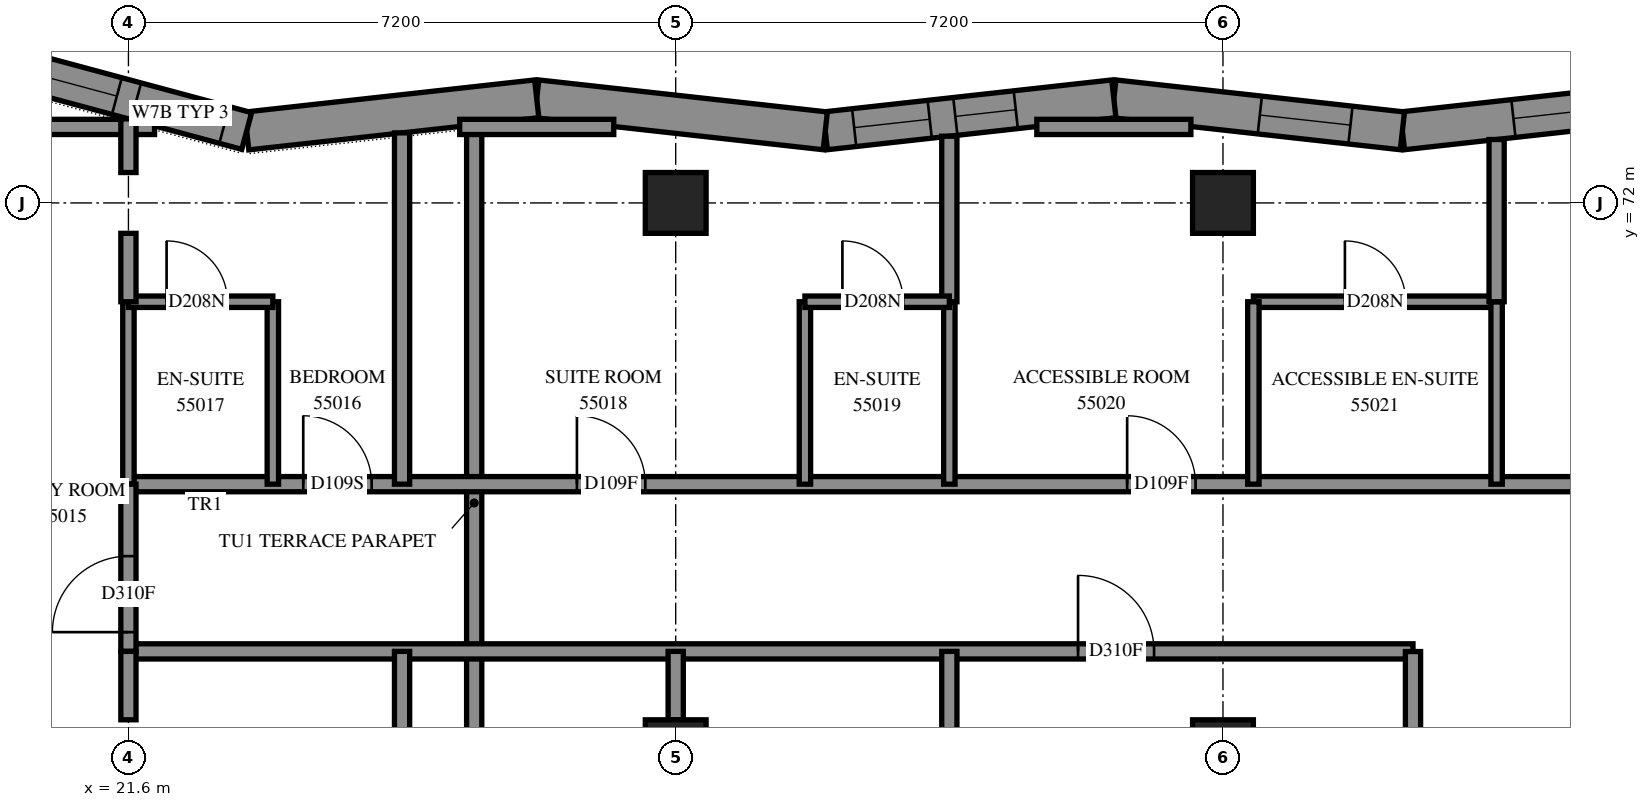
"""IFC4 building model, lengths in metres.
Left out: names, types, materials, properties, quantities, classifications, styles, units other than length and angle.
Written with IfcOpenShell. Run it as: python <this file> out.ifc"""

import sys

from ifc_helpers import new_model, si_unit, direction, frame, frame_2d, origin, origin_2d, place, context, subcontext, project, spatial, polyline, rectangle, outline, extrude, element, fill, save


model = new_model("IFC4")
c1 = context("Model", 3, precision=1e-05, world=origin(), true_north=direction((0.0, 1.0)))
c2 = subcontext(c1, "Body", "Model", "MODEL_VIEW")
j1 = project(units=[si_unit("LENGTHUNIT", "METRE"), si_unit("PLANEANGLEUNIT", "RADIAN")], contexts=[c1])
p1 = place(None, origin())
s1 = spatial("IfcSite", under=j1, at=p1, CompositionType="ELEMENT")
p2 = place(p1, origin())
s2 = spatial("IfcBuilding", under=s1, at=p2, CompositionType="ELEMENT")
p3 = place(p2, frame((0.0, 0.0, 203.2)))
s3 = spatial("IfcBuildingStorey", under=s2, at=p3, CompositionType="ELEMENT", Elevation=203.2)
for number, where, z_axis, x_axis in (
    (1, (28.8, 64.8, 0.0), (0.0, 0.0, 1.0), (1.0, 0.0, 0.0)),
    (2, (28.8, 72.0, 0.0), (0.0, 0.0, 1.0), (1.0, 0.0, 0.0)),
    (3, (36.0, 64.8, 0.0), (0.0, 0.0, 1.0), (1.0, 0.0, 0.0)),
    (4, (36.0, 72.0, 0.0), (0.0, 0.0, 1.0), (1.0, 0.0, 0.0)),
):
    element("IfcColumn", number, at=place(p3, frame(where, z_axis=z_axis, x_axis=x_axis)), inside=s3, PredefinedType="COLUMN", context=c2, shape_type="SweptSolid", body=[
        extrude(rectangle(XDim=0.8, YDim=0.8, at=origin_2d()), origin(), (0.0, 0.0, 1.0), 3.1),
    ])
p4 = place(p3, frame((42.157, 73.37, 0.0), z_axis=(0.0, 0.0, 1.0), x_axis=(-0.99390702, -0.1102217568, 0.0)))
e5 = element("IfcWall", 5, at=p4, inside=s3, PredefinedType="SOLIDWALL", context=c2, shape_type="SweptSolid", body=[
    extrude(outline(polyline([(-0.028, -0.25), (3.792, -0.25), (3.847, 0.25), (0.028, 0.25), (-0.028, -0.25)])), origin(), (0.0, 0.0, 1.0), 3.1),
])
p5 = place(p4, frame((1.15, 0.0, 0.45)))
e6 = element("IfcOpeningElement", 6, at=p5, cuts=e5, PredefinedType="OPENING", context=c2, shape_type="SweptSolid", body=[
    extrude(rectangle(XDim=1.2, YDim=2.5, at=frame_2d((0.6, 1.25))), frame((0.0, 0.26, 0.0), z_axis=(0.0, -1.0, 0.0), x_axis=(1.0, 0.0, 0.0)), (0.0, 0.0, 1.0), 0.52),
])
p6 = place(p3, frame((38.361, 72.948, 0.0), z_axis=(0.0, 0.0, 1.0), x_axis=(-0.99390702, 0.1102217568, 0.0)))
e7 = element("IfcWall", 7, at=p6, inside=s3, PredefinedType="SOLIDWALL", context=c2, shape_type="SweptSolid", body=[
    extrude(outline(polyline([(0.028, -0.25), (3.847, -0.25), (3.792, 0.25), (-0.028, 0.25), (0.028, -0.25)])), origin(), (0.0, 0.0, 1.0), 3.1),
])
p7 = place(p6, frame((0.688, 0.0, 0.45)))
e8 = element("IfcOpeningElement", 8, at=p7, cuts=e7, PredefinedType="OPENING", context=c2, shape_type="SweptSolid", body=[
    extrude(rectangle(XDim=1.2, YDim=2.5, at=frame_2d((0.6, 1.25))), frame((0.0, 0.26, 0.0), z_axis=(0.0, -1.0, 0.0), x_axis=(1.0, 0.0, 0.0)), (0.0, 0.0, 1.0), 0.52),
])
p8 = place(p3, frame((34.564, 73.37, 0.0), z_axis=(0.0, 0.0, 1.0), x_axis=(-0.993907338, -0.1102188888, 0.0)))
e9 = element("IfcWall", 9, at=p8, inside=s3, PredefinedType="SOLIDWALL", context=c2, shape_type="SweptSolid", body=[
    extrude(outline(polyline([(-0.028, -0.25), (3.792, -0.25), (3.847, 0.25), (0.028, 0.25), (-0.028, -0.25)])), origin(), (0.0, 0.0, 1.0), 3.1),
])
p9 = place(p8, frame((1.298, 0.0, 0.45)))
e10 = element("IfcOpeningElement", 10, at=p9, cuts=e9, PredefinedType="OPENING", context=c2, shape_type="SweptSolid", body=[
    extrude(rectangle(XDim=0.8, YDim=2.5, at=frame_2d((0.4, 1.25))), frame((0.0, 0.26, 0.0), z_axis=(0.0, -1.0, 0.0), x_axis=(1.0, 0.0, 0.0)), (0.0, 0.0, 1.0), 0.52),
])
p10 = place(p8, frame((2.437, 0.0, 0.45)))
e11 = element("IfcOpeningElement", 11, at=p10, cuts=e9, PredefinedType="OPENING", context=c2, shape_type="SweptSolid", body=[
    extrude(rectangle(XDim=1.0, YDim=2.5, at=frame_2d((0.5, 1.25))), frame((0.0, 0.26, 0.0), z_axis=(0.0, -1.0, 0.0), x_axis=(1.0, 0.0, 0.0)), (0.0, 0.0, 1.0), 0.52),
])
p11 = place(p3, frame((30.768, 72.948, 0.0), z_axis=(0.0, 0.0, 1.0), x_axis=(-0.99390702, 0.1102217568, 0.0)))
e12 = element("IfcWall", 12, at=p11, inside=s3, PredefinedType="SOLIDWALL", context=c2, shape_type="SweptSolid", body=[
    extrude(outline(polyline([(0.028, -0.25), (3.847, -0.25), (3.792, 0.25), (-0.028, 0.25), (0.028, -0.25)])), origin(), (0.0, 0.0, 1.0), 3.1),
])
p12 = place(p3, frame((26.972, 73.37, 0.0), z_axis=(0.0, 0.0, 1.0), x_axis=(-0.9939053168, -0.1102371135, 0.0)))
e13 = element("IfcWall", 13, at=p12, inside=s3, PredefinedType="SOLIDWALL", context=c2, shape_type="SweptSolid", body=[
    extrude(outline(polyline([(-0.028, -0.25), (3.792, -0.25), (3.886, 0.25), (0.028, 0.25), (-0.028, -0.25)])), origin(), (0.0, 0.0, 1.0), 3.1),
])
p13 = place(p3, frame((23.156, 72.946, 0.0), z_axis=(0.0, 0.0, 1.0), x_axis=(-0.9656828727, 0.2597240638, 0.0)))
e14 = element("IfcWall", 14, at=p13, inside=s3, PredefinedType="SOLIDWALL", context=c2, shape_type="SweptSolid", body=[
    extrude(outline(polyline([(0.047, -0.25), (3.978, -0.25), (3.326, 0.25), (-0.047, 0.25), (0.047, -0.25)])), origin(), (0.0, 0.0, 1.0), 3.1),
])
p14 = place(p13, frame((0.306, 0.0, 0.7)))
e15 = element("IfcOpeningElement", 15, at=p14, cuts=e14, PredefinedType="OPENING", context=c2, shape_type="SweptSolid", body=[
    extrude(rectangle(XDim=1.2, YDim=2.1, at=frame_2d((0.6, 1.05))), frame((0.0, 0.26, 0.0), z_axis=(0.0, -1.0, 0.0), x_axis=(1.0, 0.0, 0.0)), (0.0, 0.0, 1.0), 0.52),
])
p15 = place(p13, frame((1.769, 0.0, 0.7)))
e16 = element("IfcOpeningElement", 16, at=p15, cuts=e14, PredefinedType="OPENING", context=c2, shape_type="SweptSolid", body=[
    extrude(rectangle(XDim=1.2, YDim=2.1, at=frame_2d((0.6, 1.05))), frame((0.0, 0.26, 0.0), z_axis=(0.0, -1.0, 0.0), x_axis=(1.0, 0.0, 0.0)), (0.0, 0.0, 1.0), 0.52),
])
p16 = place(p3, frame((26.149, 63.079, 0.0), z_axis=(0.0, 0.0, 1.0), x_axis=(0.0, 1.0, 0.0)))
e17 = element("IfcWall", 17, at=p16, inside=s3, PredefinedType="PARAPET", context=c2, shape_type="SweptSolid", body=[
    extrude(outline(polyline([(0.0, -0.1), (9.948, -0.1), (9.948, 0.1), (0.0, 0.1), (0.0, -0.1)])), origin(), (0.0, 0.0, 1.0), 0.25),
])
p17 = place(p3, frame((21.6, 68.3, 0.0), z_axis=(0.0, 0.0, 1.0), x_axis=(1.0, 0.0, 0.0)))
e18 = element("IfcWall", 18, at=p17, inside=s3, PredefinedType="PARTITIONING", context=c2, shape_type="SweptSolid", body=[
    extrude(rectangle(XDim=19.1, YDim=0.2, at=frame_2d((9.55, 0.0))), origin(), (0.0, 0.0, 1.0), 3.1),
])
p18 = place(p17, frame((2.3, 0.0, 0.0)))
e19 = element("IfcOpeningElement", 19, at=p18, cuts=e18, PredefinedType="OPENING", context=c2, shape_type="SweptSolid", body=[
    extrude(rectangle(XDim=0.9, YDim=2.1, at=frame_2d((0.45, 1.05))), frame((0.0, 0.11, 0.0), z_axis=(0.0, -1.0, 0.0), x_axis=(1.0, 0.0, 0.0)), (0.0, 0.0, 1.0), 0.22),
])
p19 = place(p17, frame((5.901, 0.0, 0.0)))
e20 = element("IfcOpeningElement", 20, at=p19, cuts=e18, PredefinedType="OPENING", context=c2, shape_type="SweptSolid", body=[
    extrude(rectangle(XDim=0.9, YDim=2.1, at=frame_2d((0.45, 1.05))), frame((0.0, 0.11, 0.0), z_axis=(0.0, -1.0, 0.0), x_axis=(1.0, 0.0, 0.0)), (0.0, 0.0, 1.0), 0.22),
])
p20 = place(p17, frame((13.139, 0.0, 0.0)))
e21 = element("IfcOpeningElement", 21, at=p20, cuts=e18, PredefinedType="OPENING", context=c2, shape_type="SweptSolid", body=[
    extrude(rectangle(XDim=0.9, YDim=2.1, at=frame_2d((0.45, 1.05))), frame((0.0, 0.11, 0.0), z_axis=(0.0, -1.0, 0.0), x_axis=(1.0, 0.0, 0.0)), (0.0, 0.0, 1.0), 0.22),
])
p21 = place(p3, frame((21.6, 66.1, 0.0), z_axis=(0.0, 0.0, 1.0), x_axis=(1.0, 0.0, 0.0)))
e22 = element("IfcWall", 22, at=p21, inside=s3, PredefinedType="PARTITIONING", context=c2, shape_type="SweptSolid", body=[
    extrude(rectangle(XDim=16.9, YDim=0.2, at=frame_2d((8.45, 0.0))), origin(), (0.0, 0.0, 1.0), 3.1),
])
p22 = place(p21, frame((12.493, 0.0, 0.0)))
e23 = element("IfcOpeningElement", 23, at=p22, cuts=e22, PredefinedType="OPENING", context=c2, shape_type="SweptSolid", body=[
    extrude(rectangle(XDim=1.0, YDim=2.1, at=frame_2d((0.5, 1.05))), frame((0.0, 0.11, 0.0), z_axis=(0.0, -1.0, 0.0), x_axis=(1.0, 0.0, 0.0)), (0.0, 0.0, 1.0), 0.22),
])
p23 = place(p3, frame((25.2, 68.3, 0.0), z_axis=(0.0, 0.0, 1.0), x_axis=(0.0, 1.0, 0.0)))
e24 = element("IfcWall", 24, at=p23, inside=s3, PredefinedType="PARTITIONING", context=c2, shape_type="SweptSolid", body=[
    extrude(rectangle(XDim=4.622, YDim=0.2, at=frame_2d((2.311, 0.0))), origin(), (0.0, 0.0, 1.0), 3.1),
])
p24 = place(p3, frame((36.4, 70.7, 0.0), z_axis=(0.0, 0.0, 1.0), x_axis=(1.0, 0.0, 0.0)))
e25 = element("IfcWall", 25, at=p24, inside=s3, PredefinedType="PARTITIONING", context=c2, shape_type="SweptSolid", body=[
    extrude(rectangle(XDim=3.2, YDim=0.15, at=frame_2d((1.6, 0.0))), origin(), (0.0, 0.0, 1.0), 3.1),
])
p25 = place(p24, frame((1.204, 0.0, 0.0)))
e26 = element("IfcOpeningElement", 26, at=p25, cuts=e25, PredefinedType="OPENING", context=c2, shape_type="SweptSolid", body=[
    extrude(rectangle(XDim=0.8, YDim=2.1, at=frame_2d((0.4, 1.05))), frame((0.0, 0.085, 0.0), z_axis=(0.0, -1.0, 0.0), x_axis=(1.0, 0.0, 0.0)), (0.0, 0.0, 1.0), 0.17),
])
for number, where, z_axis, x_axis in (
    (27, (25.2, 63.079, 0.0), (0.0, 0.0, 1.0), (0.0, 1.0, 0.0)),
    (28, (32.4, 63.079, 0.0), (0.0, 0.0, 1.0), (0.0, 1.0, 0.0)),
):
    element("IfcWall", number, at=place(p3, frame(where, z_axis=z_axis, x_axis=x_axis)), inside=s3, PredefinedType="PARTITIONING", context=c2, shape_type="SweptSolid", body=[
        extrude(rectangle(XDim=3.021, YDim=0.2, at=frame_2d((1.51, 0.0))), origin(), (0.0, 0.0, 1.0), 3.1),
    ])
p26 = place(p3, frame((38.5, 63.502, 0.0), z_axis=(0.0, 0.0, 1.0), x_axis=(0.0, 1.0, 0.0)))
e29 = element("IfcWall", 29, at=p26, inside=s3, PredefinedType="PARTITIONING", context=c2, shape_type="SweptSolid", body=[
    extrude(rectangle(XDim=2.596, YDim=0.2, at=frame_2d((1.298, 0.0))), origin(), (0.0, 0.0, 1.0), 3.1),
])
for number, where, z_axis, x_axis in (
    (30, (21.6, 68.3, 0.0), (0.0, 0.0, 1.0), (0.0, 1.0, 0.0)),
    (31, (23.5, 68.3, 0.0), (0.0, 0.0, 1.0), (0.0, 1.0, 0.0)),
    (32, (30.5, 68.3, 0.0), (0.0, 0.0, 1.0), (0.0, 1.0, 0.0)),
    (33, (32.4, 68.3, 0.0), (0.0, 0.0, 1.0), (0.0, 1.0, 0.0)),
    (34, (36.4, 68.3, 0.0), (0.0, 0.0, 1.0), (0.0, 1.0, 0.0)),
    (35, (39.6, 68.3, 0.0), (0.0, 0.0, 1.0), (0.0, 1.0, 0.0)),
):
    element("IfcWall", number, at=place(p3, frame(where, z_axis=z_axis, x_axis=x_axis)), inside=s3, PredefinedType="PARTITIONING", context=c2, shape_type="SweptSolid", body=[
        extrude(rectangle(XDim=2.4, YDim=0.15, at=frame_2d((1.2, 0.0))), origin(), (0.0, 0.0, 1.0), 3.1),
    ])
p27 = place(p3, frame((21.6, 66.1, 0.0), z_axis=(0.0, 0.0, 1.0), x_axis=(0.0, 1.0, 0.0)))
e36 = element("IfcWall", 36, at=p27, inside=s3, PredefinedType="PARTITIONING", context=c2, shape_type="SweptSolid", body=[
    extrude(rectangle(XDim=2.2, YDim=0.2, at=frame_2d((1.1, 0.0))), origin(), (0.0, 0.0, 1.0), 3.1),
])
p28 = place(p27, frame((0.253, 0.0, 0.0)))
e37 = element("IfcOpeningElement", 37, at=p28, cuts=e36, PredefinedType="OPENING", context=c2, shape_type="SweptSolid", body=[
    extrude(rectangle(XDim=1.0, YDim=2.1, at=frame_2d((0.5, 1.05))), frame((0.0, 0.11, 0.0), z_axis=(0.0, -1.0, 0.0), x_axis=(1.0, 0.0, 0.0)), (0.0, 0.0, 1.0), 0.22),
])
p29 = place(p3, frame((32.4, 70.7, 0.0), z_axis=(0.0, 0.0, 1.0), x_axis=(0.0, 1.0, 0.0)))
e38 = element("IfcWall", 38, at=p29, inside=s3, PredefinedType="PARTITIONING", context=c2, shape_type="SweptSolid", body=[
    extrude(rectangle(XDim=2.178, YDim=0.2, at=frame_2d((1.089, 0.0))), origin(), (0.0, 0.0, 1.0), 3.1),
])
p30 = place(p3, frame((39.6, 70.7, 0.0), z_axis=(0.0, 0.0, 1.0), x_axis=(0.0, 1.0, 0.0)))
e39 = element("IfcWall", 39, at=p30, inside=s3, PredefinedType="PARTITIONING", context=c2, shape_type="SweptSolid", body=[
    extrude(rectangle(XDim=2.134, YDim=0.2, at=frame_2d((1.067, 0.0))), origin(), (0.0, 0.0, 1.0), 3.1),
])
for number, where, z_axis, x_axis in (
    (40, (33.551, 73.0, 0.0), (0.0, 0.0, 1.0), (1.0, 0.0, 0.0)),
    (41, (25.958, 73.0, 0.0), (0.0, 0.0, 1.0), (1.0, 0.0, 0.0)),
):
    element("IfcWall", number, at=place(p3, frame(where, z_axis=z_axis, x_axis=x_axis)), inside=s3, PredefinedType="PARTITIONING", context=c2, shape_type="SweptSolid", body=[
        extrude(rectangle(XDim=2.027, YDim=0.2, at=frame_2d((1.013, 0.0))), origin(), (0.0, 0.0, 1.0), 3.1),
    ])
p31 = place(p3, frame((19.879, 73.0, 0.0), z_axis=(0.0, 0.0, 1.0), x_axis=(1.0, 0.0, 0.0)))
e42 = element("IfcWall", 42, at=p31, inside=s3, PredefinedType="PARTITIONING", context=c2, shape_type="SweptSolid", body=[
    extrude(rectangle(XDim=2.065, YDim=0.2, at=frame_2d((1.032, 0.0))), origin(), (0.0, 0.0, 1.0), 3.1),
])
p32 = place(p3, frame((21.6, 70.7, 0.0), z_axis=(0.0, 0.0, 1.0), x_axis=(1.0, 0.0, 0.0)))
e43 = element("IfcWall", 43, at=p32, inside=s3, PredefinedType="PARTITIONING", context=c2, shape_type="SweptSolid", body=[
    extrude(rectangle(XDim=1.9, YDim=0.15, at=frame_2d((0.95, 0.0))), origin(), (0.0, 0.0, 1.0), 3.1),
])
p33 = place(p32, frame((0.502, 0.0, 0.0)))
e44 = element("IfcOpeningElement", 44, at=p33, cuts=e43, PredefinedType="OPENING", context=c2, shape_type="SweptSolid", body=[
    extrude(rectangle(XDim=0.8, YDim=2.1, at=frame_2d((0.4, 1.05))), frame((0.0, 0.085, 0.0), z_axis=(0.0, -1.0, 0.0), x_axis=(1.0, 0.0, 0.0)), (0.0, 0.0, 1.0), 0.17),
])
p34 = place(p3, frame((30.5, 70.7, 0.0), z_axis=(0.0, 0.0, 1.0), x_axis=(1.0, 0.0, 0.0)))
e45 = element("IfcWall", 45, at=p34, inside=s3, PredefinedType="PARTITIONING", context=c2, shape_type="SweptSolid", body=[
    extrude(rectangle(XDim=1.9, YDim=0.15, at=frame_2d((0.95, 0.0))), origin(), (0.0, 0.0, 1.0), 3.1),
])
p35 = place(p34, frame((0.493, 0.0, 0.0)))
e46 = element("IfcOpeningElement", 46, at=p35, cuts=e45, PredefinedType="OPENING", context=c2, shape_type="SweptSolid", body=[
    extrude(rectangle(XDim=0.8, YDim=2.1, at=frame_2d((0.4, 1.05))), frame((0.0, 0.085, 0.0), z_axis=(0.0, -1.0, 0.0), x_axis=(1.0, 0.0, 0.0)), (0.0, 0.0, 1.0), 0.17),
])
for number, where, z_axis, x_axis in (
    (47, (21.6, 65.2, 0.0), (0.0, 0.0, 1.0), (0.0, 1.0, 0.0)),
    (48, (21.6, 70.7, 0.0), (0.0, 0.0, 1.0), (0.0, 1.0, 0.0)),
):
    element("IfcWall", number, at=place(p3, frame(where, z_axis=z_axis, x_axis=x_axis)), inside=s3, PredefinedType="PARTITIONING", context=c2, shape_type="SweptSolid", body=[
        extrude(rectangle(XDim=0.9, YDim=0.2, at=frame_2d((0.45, 0.0))), origin(), (0.0, 0.0, 1.0), 3.1),
    ])
p36 = place(p3, frame((28.8, 65.2, 0.0), z_axis=(0.0, 0.0, 1.0), x_axis=(0.0, 1.0, 0.0)))
e49 = element("IfcWall", 49, at=p36, inside=s3, PredefinedType="PARTITIONING", context=c2, shape_type="SweptSolid", body=[
    extrude(rectangle(XDim=0.9, YDim=0.2, at=frame_2d((0.45, 0.0))), origin(), (0.0, 0.0, 1.0), 2.6),
])
p37 = place(p3, frame((21.6, 72.4, 0.0), z_axis=(0.0, 0.0, 1.0), x_axis=(0.0, 1.0, 0.0)))
e50 = element("IfcWall", 50, at=p37, inside=s3, PredefinedType="PARTITIONING", context=c2, shape_type="SweptSolid", body=[
    extrude(rectangle(XDim=0.706, YDim=0.2, at=frame_2d((0.353, 0.0))), origin(), (0.0, 0.0, 1.0), 3.1),
])
p38 = place(p5, origin())
e51 = element("IfcWindow", 51, at=p38, inside=s3, PartitioningType="SINGLE_PANEL", PredefinedType="WINDOW", context=c2, shape_type="SweptSolid", body=[
    extrude(rectangle(XDim=1.2, YDim=2.5, at=frame_2d((0.6, 1.25))), frame((0.0, 0.18, 0.0), z_axis=(0.0, -1.0, 0.0), x_axis=(1.0, 0.0, 0.0)), (0.0, 0.0, 1.0), 0.06),
])
fill(e6, e51)
p39 = place(p7, origin())
e52 = element("IfcWindow", 52, at=p39, inside=s3, PartitioningType="SINGLE_PANEL", PredefinedType="WINDOW", context=c2, shape_type="SweptSolid", body=[
    extrude(rectangle(XDim=1.2, YDim=2.5, at=frame_2d((0.6, 1.25))), frame((0.0, 0.18, 0.0), z_axis=(0.0, -1.0, 0.0), x_axis=(1.0, 0.0, 0.0)), (0.0, 0.0, 1.0), 0.06),
])
fill(e8, e52)
p40 = place(p14, origin())
e53 = element("IfcWindow", 53, at=p40, inside=s3, PartitioningType="SINGLE_PANEL", PredefinedType="WINDOW", context=c2, shape_type="SweptSolid", body=[
    extrude(rectangle(XDim=1.2, YDim=2.1, at=frame_2d((0.6, 1.05))), frame((0.0, 0.13, 0.0), z_axis=(0.0, -1.0, 0.0), x_axis=(1.0, 0.0, 0.0)), (0.0, 0.0, 1.0), 0.06),
])
fill(e15, e53)
p41 = place(p15, origin())
e54 = element("IfcWindow", 54, at=p41, inside=s3, PartitioningType="SINGLE_PANEL", PredefinedType="WINDOW", context=c2, shape_type="SweptSolid", body=[
    extrude(rectangle(XDim=1.2, YDim=2.1, at=frame_2d((0.6, 1.05))), frame((0.0, 0.18, 0.0), z_axis=(0.0, -1.0, 0.0), x_axis=(1.0, 0.0, 0.0)), (0.0, 0.0, 1.0), 0.06),
])
fill(e16, e54)
p42 = place(p28, origin())
e55 = element("IfcDoor", 55, at=p42, inside=s3, OperationType="SINGLE_SWING_RIGHT", PredefinedType="DOOR", context=c2, shape_type="SweptSolid", body=[
    extrude(rectangle(XDim=1.0, YDim=2.1, at=frame_2d((0.5, 1.05))), frame((0.0, 0.025, 0.0), z_axis=(0.0, -1.0, 0.0), x_axis=(1.0, 0.0, 0.0)), (0.0, 0.0, 1.0), 0.05),
])
fill(e37, e55)
p43 = place(p18, origin())
e56 = element("IfcDoor", 56, at=p43, inside=s3, OperationType="SINGLE_SWING_RIGHT", PredefinedType="DOOR", context=c2, shape_type="SweptSolid", body=[
    extrude(rectangle(XDim=0.9, YDim=2.1, at=frame_2d((0.45, 1.05))), frame((0.0, 0.025, 0.0), z_axis=(0.0, -1.0, 0.0), x_axis=(1.0, 0.0, 0.0)), (0.0, 0.0, 1.0), 0.05),
])
fill(e19, e56)
p44 = place(p33, origin())
e57 = element("IfcDoor", 57, at=p44, inside=s3, OperationType="SINGLE_SWING_RIGHT", PredefinedType="DOOR", context=c2, shape_type="SweptSolid", body=[
    extrude(rectangle(XDim=0.8, YDim=2.1, at=frame_2d((0.4, 1.05))), frame((0.0, 0.025, 0.0), z_axis=(0.0, -1.0, 0.0), x_axis=(1.0, 0.0, 0.0)), (0.0, 0.0, 1.0), 0.05),
])
fill(e44, e57)
p45 = place(p19, origin())
e58 = element("IfcDoor", 58, at=p45, inside=s3, OperationType="SINGLE_SWING_LEFT", PredefinedType="DOOR", context=c2, shape_type="SweptSolid", body=[
    extrude(rectangle(XDim=0.9, YDim=2.1, at=frame_2d((0.45, 1.05))), frame((0.0, 0.025, 0.0), z_axis=(0.0, -1.0, 0.0), x_axis=(1.0, 0.0, 0.0)), (0.0, 0.0, 1.0), 0.05),
])
fill(e20, e58)
p46 = place(p35, origin())
e59 = element("IfcDoor", 59, at=p46, inside=s3, OperationType="SINGLE_SWING_RIGHT", PredefinedType="DOOR", context=c2, shape_type="SweptSolid", body=[
    extrude(rectangle(XDim=0.8, YDim=2.1, at=frame_2d((0.4, 1.05))), frame((0.0, 0.025, 0.0), z_axis=(0.0, -1.0, 0.0), x_axis=(1.0, 0.0, 0.0)), (0.0, 0.0, 1.0), 0.05),
])
fill(e46, e59)
p47 = place(p20, origin())
e60 = element("IfcDoor", 60, at=p47, inside=s3, OperationType="SINGLE_SWING_LEFT", PredefinedType="DOOR", context=c2, shape_type="SweptSolid", body=[
    extrude(rectangle(XDim=0.9, YDim=2.1, at=frame_2d((0.45, 1.05))), frame((0.0, 0.025, 0.0), z_axis=(0.0, -1.0, 0.0), x_axis=(1.0, 0.0, 0.0)), (0.0, 0.0, 1.0), 0.05),
])
fill(e21, e60)
p48 = place(p25, origin())
e61 = element("IfcDoor", 61, at=p48, inside=s3, OperationType="SINGLE_SWING_RIGHT", PredefinedType="DOOR", context=c2, shape_type="SweptSolid", body=[
    extrude(rectangle(XDim=0.8, YDim=2.1, at=frame_2d((0.4, 1.05))), frame((0.0, 0.025, 0.0), z_axis=(0.0, -1.0, 0.0), x_axis=(1.0, 0.0, 0.0)), (0.0, 0.0, 1.0), 0.05),
])
fill(e26, e61)
p49 = place(p22, origin())
e62 = element("IfcDoor", 62, at=p49, inside=s3, OperationType="SINGLE_SWING_RIGHT", PredefinedType="DOOR", context=c2, shape_type="SweptSolid", body=[
    extrude(rectangle(XDim=1.0, YDim=2.1, at=frame_2d((0.5, 1.05))), frame((0.0, 0.025, 0.0), z_axis=(0.0, -1.0, 0.0), x_axis=(1.0, 0.0, 0.0)), (0.0, 0.0, 1.0), 0.05),
])
fill(e23, e62)
p50 = place(p9, origin())
e63 = element("IfcWindow", 63, at=p50, inside=s3, PartitioningType="SINGLE_PANEL", PredefinedType="WINDOW", context=c2, shape_type="SweptSolid", body=[
    extrude(rectangle(XDim=0.8, YDim=2.5, at=frame_2d((0.4, 1.25))), frame((0.0, 0.18, 0.0), z_axis=(0.0, -1.0, 0.0), x_axis=(1.0, 0.0, 0.0)), (0.0, 0.0, 1.0), 0.06),
])
fill(e10, e63)
p51 = place(p10, origin())
e64 = element("IfcWindow", 64, at=p51, inside=s3, PartitioningType="SINGLE_PANEL", PredefinedType="WINDOW", context=c2, shape_type="SweptSolid", body=[
    extrude(rectangle(XDim=1.0, YDim=2.5, at=frame_2d((0.5, 1.25))), frame((0.0, 0.18, 0.0), z_axis=(0.0, -1.0, 0.0), x_axis=(1.0, 0.0, 0.0)), (0.0, 0.0, 1.0), 0.06),
])
fill(e11, e64)
save(model, sys.argv[1])
